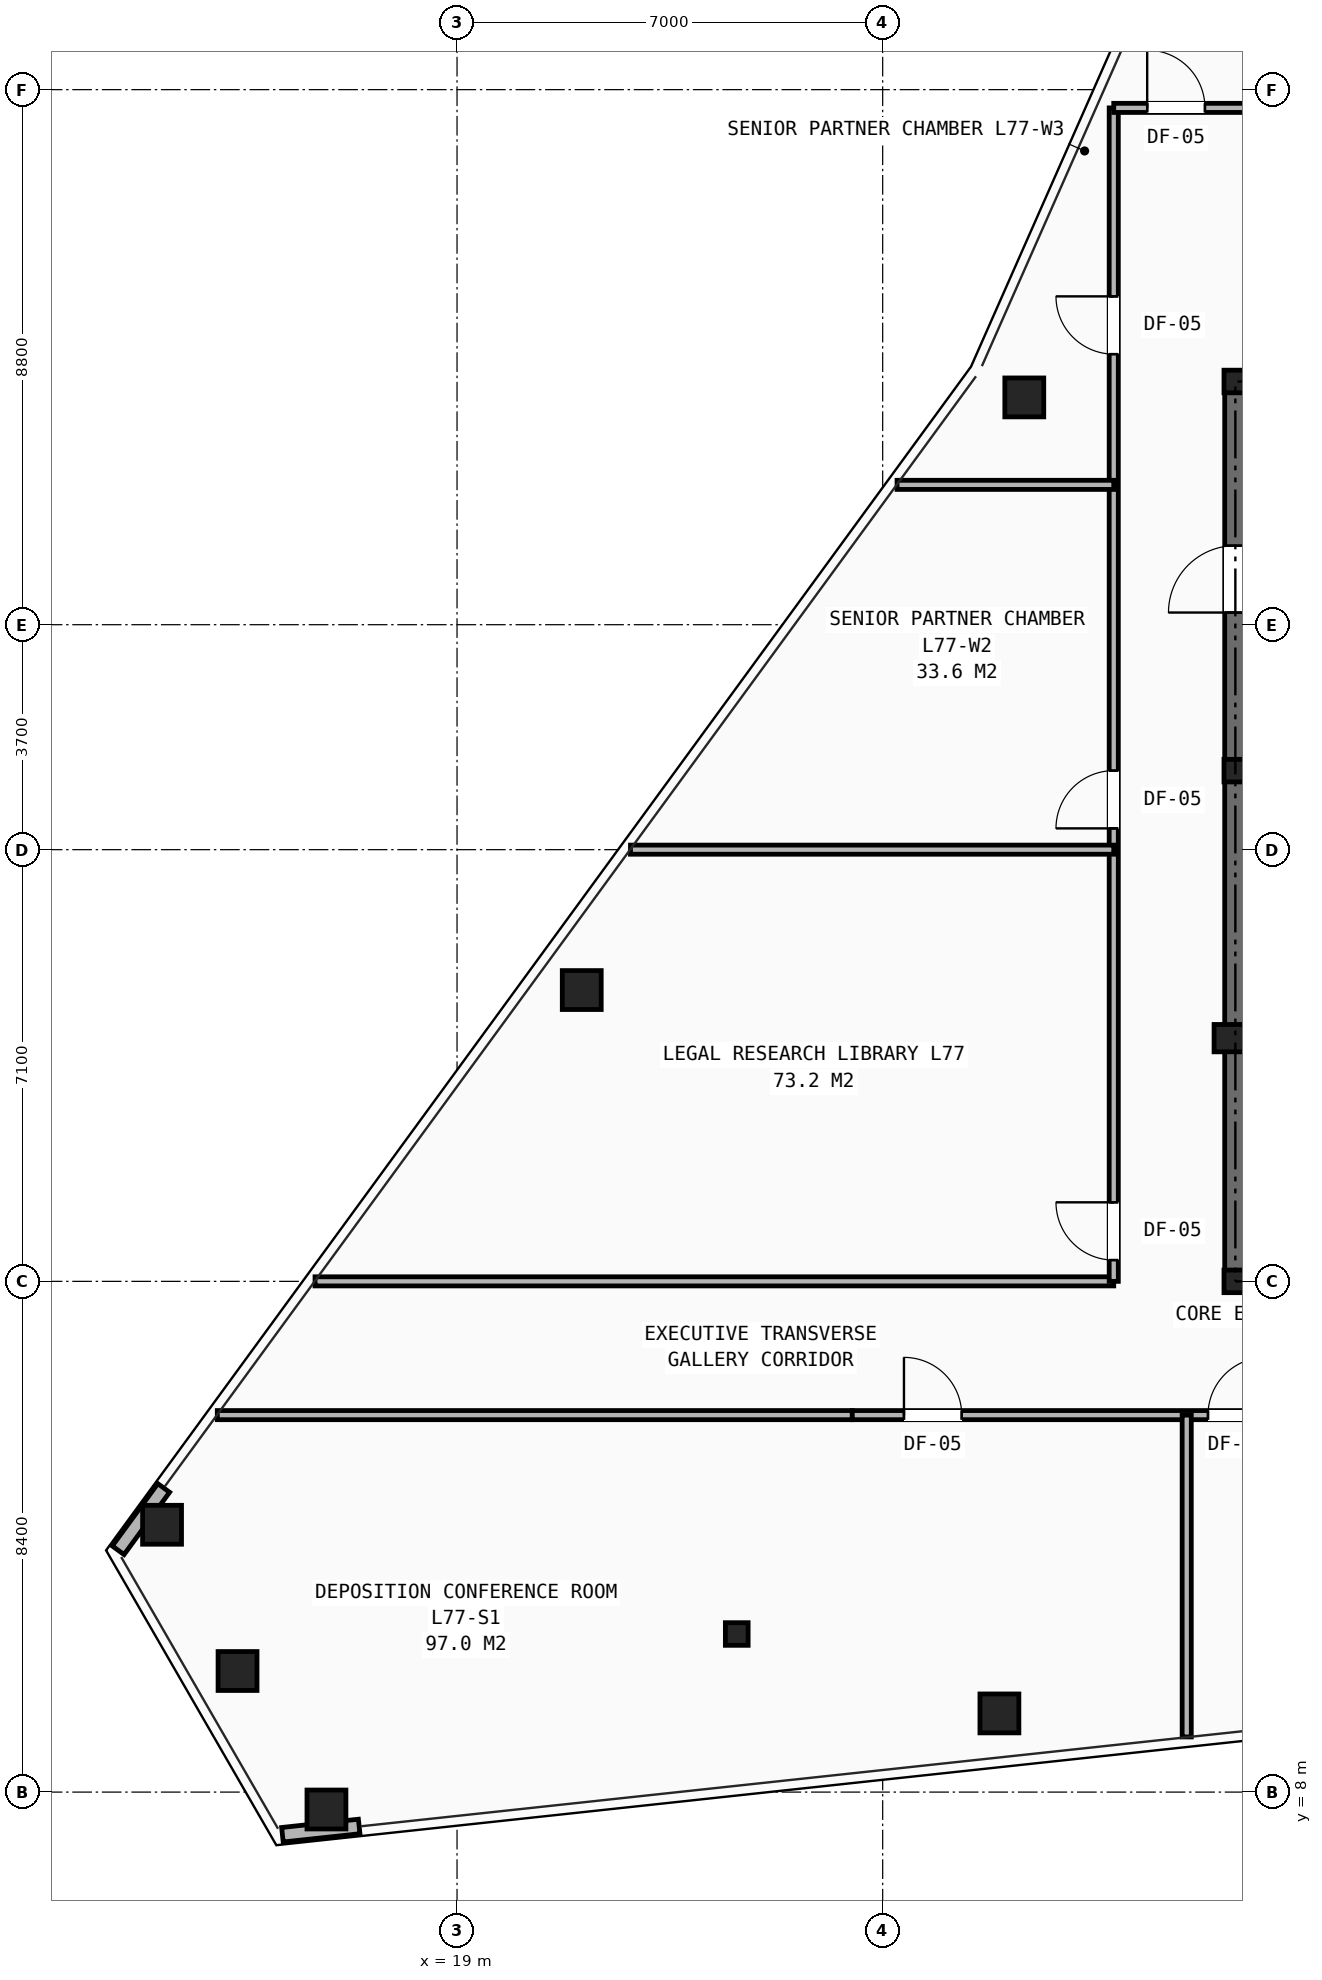
"""IFC4 building model, lengths in metres.
Left out: names, types, materials, properties, quantities, classifications, styles, units other than length and angle.
Written with IfcOpenShell. Run it as: python <this file> out.ifc"""

import sys

from ifc_helpers import new_model, si_unit, direction, frame, frame_2d, origin, origin_2d, place, context, subcontext, project, spatial, rectangle, hollow_rectangle, i_section, extrude, element, fill, save


model = new_model("IFC4")
c1 = context("Model", 3, precision=1e-05, world=origin(), true_north=direction((0.0, 1.0)))
c2 = subcontext(c1, "Body", "Model", "MODEL_VIEW")
j1 = project(units=[si_unit("LENGTHUNIT", "METRE"), si_unit("PLANEANGLEUNIT", "RADIAN")], contexts=[c1])
p1 = place(None, origin())
s1 = spatial("IfcSite", under=j1, at=p1, CompositionType="ELEMENT")
p2 = place(p1, origin())
s2 = spatial("IfcBuilding", under=s1, at=p2, CompositionType="ELEMENT")
p3 = place(p2, frame((0.0, 0.0, 272.5)))
s3 = spatial("IfcBuildingStorey", under=s2, at=p3, CompositionType="ELEMENT", Elevation=272.5)
for number, where, z_axis, x_axis in (
    (1, (31.8, 16.4, 0.0), (0.0, 0.0, 1.0), (1.0, 0.0, 0.0)),
    (2, (31.8, 24.8, 0.0), (0.0, 0.0, 1.0), (1.0, 0.0, 0.0)),
    (3, (31.8, 31.2, 0.0), (0.0, 0.0, 1.0), (1.0, 0.0, 0.0)),
    (4, (23.6, 10.6, 0.0), (0.0, 0.0, 1.0), (1.0, 0.0, 0.0)),
):
    element("IfcColumn", number, at=place(p3, frame(where, z_axis=z_axis, x_axis=x_axis)), inside=s3, PredefinedType="COLUMN", context=c2, shape_type="SweptSolid", body=[
        extrude(i_section(OverallWidth=0.374, OverallDepth=0.372, WebThickness=0.016, FlangeThickness=0.026, at=origin_2d()), origin(), (0.0, 0.0, 1.0), 3.5),
    ])
p4 = place(p3, frame((31.8, 20.4, 0.0), z_axis=(0.0, 0.0, 1.0), x_axis=(1.0, 0.0, 0.0)))
e5 = element("IfcColumn", 5, at=p4, inside=s3, PredefinedType="PILASTER", context=c2, shape_type="SweptSolid", body=[
    extrude(rectangle(XDim=0.7, YDim=0.45, at=origin_2d()), origin(), (0.0, 0.0, 1.0), 3.5),
])
for number, where, z_axis, x_axis in (
    (6, (28.329, 30.938, 0.0), (0.0, 0.0, 1.0), (1.0, 0.0, 0.0)),
    (7, (21.051, 21.191, 0.0), (0.0, 0.0, 1.0), (1.0, 0.0, 0.0)),
    (8, (14.149, 12.397, 0.0), (0.0, 0.0, 1.0), (1.0, 0.0, 0.0)),
    (9, (15.39, 9.991, 0.0), (0.0, 0.0, 1.0), (1.0, 0.0, 0.0)),
    (10, (16.852, 7.714, 0.0), (0.0, 0.0, 1.0), (1.0, 0.0, 0.0)),
    (11, (27.92, 9.294, 0.0), (0.0, 0.0, 1.0), (1.0, 0.0, 0.0)),
):
    element("IfcColumn", number, at=place(p3, frame(where, z_axis=z_axis, x_axis=x_axis)), inside=s3, PredefinedType="COLUMN", context=c2, shape_type="SweptSolid", body=[
        extrude(hollow_rectangle(XDim=0.64, YDim=0.64, WallThickness=0.045, at=origin_2d()), origin(), (0.0, 0.0, 1.0), 3.5),
    ])
for number, where, z_axis, x_axis in (
    (12, (14.176, 13.002, 0.0), (0.0, 0.0, 1.0), (-0.59, -0.807, 0.0)),
    (13, (16.128, 7.298, 0.0), (0.0, 0.0, 1.0), (0.994, 0.107, 0.0)),
):
    element("IfcWall", number, at=place(p3, frame(where, z_axis=z_axis, x_axis=x_axis)), inside=s3, PredefinedType="SHEAR", context=c2, shape_type="SweptSolid", body=[
        extrude(rectangle(XDim=1.269, YDim=0.24, at=frame_2d((0.635, 0.0))), origin(), (0.0, 0.0, 1.0), 2.623),
    ])
p5 = place(p3, frame((31.8, 16.4, 0.0), z_axis=(0.0, 0.0, 1.0), x_axis=(1.0, 0.0, 0.0)))
e14 = element("IfcWall", 14, at=p5, inside=s3, PredefinedType="SHEAR", context=c2, shape_type="SweptSolid", body=[
    extrude(rectangle(XDim=16.4, YDim=0.35, at=frame_2d((8.2, 0.0))), origin(), (0.0, 0.0, 1.0), 3.25),
])
p6 = place(p5, frame((4.2, 0.0, 0.0)))
e15 = element("IfcOpeningElement", 15, at=p6, cuts=e14, PredefinedType="OPENING", context=c2, shape_type="SweptSolid", body=[
    extrude(rectangle(XDim=0.95, YDim=2.1, at=frame_2d((0.475, 1.05))), frame((0.0, 0.185, 0.0), z_axis=(0.0, -1.0, 0.0), x_axis=(1.0, 0.0, 0.0)), (0.0, 0.0, 1.0), 0.37),
])
p7 = place(p5, frame((10.6, 0.0, 0.0)))
e16 = element("IfcOpeningElement", 16, at=p7, cuts=e14, PredefinedType="OPENING", context=c2, shape_type="SweptSolid", body=[
    extrude(rectangle(XDim=0.95, YDim=2.1, at=frame_2d((0.475, 1.05))), frame((0.0, 0.185, 0.0), z_axis=(0.0, -1.0, 0.0), x_axis=(1.0, 0.0, 0.0)), (0.0, 0.0, 1.0), 0.37),
])
p8 = place(p3, frame((31.8, 31.2, 0.0), z_axis=(0.0, 0.0, 1.0), x_axis=(1.0, 0.0, 0.0)))
e17 = element("IfcWall", 17, at=p8, inside=s3, PredefinedType="SHEAR", context=c2, shape_type="SweptSolid", body=[
    extrude(rectangle(XDim=16.4, YDim=0.35, at=frame_2d((8.2, 0.0))), origin(), (0.0, 0.0, 1.0), 3.25),
])
p9 = place(p3, frame((31.8, 16.4, 0.0), z_axis=(0.0, 0.0, 1.0), x_axis=(0.0, 1.0, 0.0)))
e18 = element("IfcWall", 18, at=p9, inside=s3, PredefinedType="SHEAR", context=c2, shape_type="SweptSolid", body=[
    extrude(rectangle(XDim=14.8, YDim=0.35, at=frame_2d((7.4, 0.0))), origin(), (0.0, 0.0, 1.0), 3.25),
])
p10 = place(p9, frame((11.0, 0.0, 0.0)))
e19 = element("IfcOpeningElement", 19, at=p10, cuts=e18, PredefinedType="OPENING", context=c2, shape_type="SweptSolid", body=[
    extrude(rectangle(XDim=1.1, YDim=2.15, at=frame_2d((0.55, 1.075))), frame((0.0, 0.185, 0.0), z_axis=(0.0, -1.0, 0.0), x_axis=(1.0, 0.0, 0.0)), (0.0, 0.0, 1.0), 0.37),
])
p11 = place(p3, frame((31.8, 24.755, 0.0), z_axis=(0.0, 0.0, 1.0), x_axis=(1.0, 0.0, 0.0)))
e20 = element("IfcWall", 20, at=p11, inside=s3, PredefinedType="SHEAR", context=c2, shape_type="SweptSolid", body=[
    extrude(rectangle(XDim=3.245, YDim=0.25, at=frame_2d((1.623, 0.0))), origin(), (0.0, 0.0, 1.0), 3.25),
])
p12 = place(p3, frame((15.057, 14.2, 0.0), z_axis=(0.0, 0.0, 1.0), x_axis=(1.0, 0.0, 0.0)))
e21 = element("IfcWall", 21, at=p12, inside=s3, PredefinedType="PARTITIONING", context=c2, shape_type="SweptSolid", body=[
    extrude(rectangle(XDim=10.443, YDim=0.15, at=frame_2d((5.221, 0.0))), origin(), (0.0, 0.0, 1.0), 2.265),
])
p13 = place(p3, frame((16.665, 16.4, 0.0), z_axis=(0.0, 0.0, 1.0), x_axis=(1.0, 0.0, 0.0)))
e22 = element("IfcWall", 22, at=p13, inside=s3, PredefinedType="PARTITIONING", context=c2, shape_type="SweptSolid", body=[
    extrude(rectangle(XDim=13.135, YDim=0.15, at=frame_2d((6.568, 0.0))), origin(), (0.0, 0.0, 1.0), 2.265),
])
p14 = place(p3, frame((29.8, 16.4, 0.0), z_axis=(0.0, 0.0, 1.0), x_axis=(0.0, 1.0, 0.0)))
e23 = element("IfcWall", 23, at=p14, inside=s3, PredefinedType="PARTITIONING", context=c2, shape_type="SweptSolid", body=[
    extrude(rectangle(XDim=19.3, YDim=0.15, at=frame_2d((9.65, 0.0))), origin(), (0.0, 0.0, 1.0), 2.265),
])
p15 = place(p14, frame((0.35, 0.0, 0.0)))
e24 = element("IfcOpeningElement", 24, at=p15, cuts=e23, PredefinedType="OPENING", context=c2, shape_type="SweptSolid", body=[
    extrude(rectangle(XDim=0.95, YDim=2.1, at=frame_2d((0.475, 1.05))), frame((0.0, 0.085, 0.0), z_axis=(0.0, -1.0, 0.0), x_axis=(1.0, 0.0, 0.0)), (0.0, 0.0, 1.0), 0.17),
])
p16 = place(p14, frame((7.45, 0.0, 0.0)))
e25 = element("IfcOpeningElement", 25, at=p16, cuts=e23, PredefinedType="OPENING", context=c2, shape_type="SweptSolid", body=[
    extrude(rectangle(XDim=0.95, YDim=2.1, at=frame_2d((0.475, 1.05))), frame((0.0, 0.085, 0.0), z_axis=(0.0, -1.0, 0.0), x_axis=(1.0, 0.0, 0.0)), (0.0, 0.0, 1.0), 0.17),
])
p17 = place(p14, frame((15.25, 0.0, 0.0)))
e26 = element("IfcOpeningElement", 26, at=p17, cuts=e23, PredefinedType="OPENING", context=c2, shape_type="SweptSolid", body=[
    extrude(rectangle(XDim=0.95, YDim=2.1, at=frame_2d((0.475, 1.05))), frame((0.0, 0.085, 0.0), z_axis=(0.0, -1.0, 0.0), x_axis=(1.0, 0.0, 0.0)), (0.0, 0.0, 1.0), 0.17),
])
p18 = place(p3, frame((29.8, 35.7, 0.0), z_axis=(0.0, 0.0, 1.0), x_axis=(1.0, 0.0, 0.0)))
e27 = element("IfcWall", 27, at=p18, inside=s3, PredefinedType="PARTITIONING", context=c2, shape_type="SweptSolid", body=[
    extrude(rectangle(XDim=9.45, YDim=0.15, at=frame_2d((4.725, 0.0))), origin(), (0.0, 0.0, 1.0), 2.628),
])
p19 = place(p18, frame((0.55, 0.0, 0.0)))
e28 = element("IfcOpeningElement", 28, at=p19, cuts=e27, PredefinedType="OPENING", context=c2, shape_type="SweptSolid", body=[
    extrude(rectangle(XDim=0.95, YDim=2.1, at=frame_2d((0.475, 1.05))), frame((0.0, 0.085, 0.0), z_axis=(0.0, -1.0, 0.0), x_axis=(1.0, 0.0, 0.0)), (0.0, 0.0, 1.0), 0.17),
])
p20 = place(p18, frame((5.35, 0.0, 0.0)))
e29 = element("IfcOpeningElement", 29, at=p20, cuts=e27, PredefinedType="OPENING", context=c2, shape_type="SweptSolid", body=[
    extrude(rectangle(XDim=0.95, YDim=2.1, at=frame_2d((0.475, 1.05))), frame((0.0, 0.085, 0.0), z_axis=(0.0, -1.0, 0.0), x_axis=(1.0, 0.0, 0.0)), (0.0, 0.0, 1.0), 0.17),
])
p21 = place(p3, frame((25.5, 14.2, 0.0), z_axis=(0.0, 0.0, 1.0), x_axis=(1.0, 0.0, 0.0)))
e30 = element("IfcWall", 30, at=p21, inside=s3, PredefinedType="PARTITIONING", context=c2, shape_type="SweptSolid", body=[
    extrude(rectangle(XDim=29.0, YDim=0.15, at=frame_2d((14.5, 0.0))), origin(), (0.0, 0.0, 1.0), 2.265),
])
p22 = place(p21, frame((0.85, 0.0, 0.0)))
e31 = element("IfcOpeningElement", 31, at=p22, cuts=e30, PredefinedType="OPENING", context=c2, shape_type="SweptSolid", body=[
    extrude(rectangle(XDim=0.95, YDim=2.1, at=frame_2d((0.475, 1.05))), frame((0.0, 0.085, 0.0), z_axis=(0.0, -1.0, 0.0), x_axis=(1.0, 0.0, 0.0)), (0.0, 0.0, 1.0), 0.17),
])
p23 = place(p21, frame((5.85, 0.0, 0.0)))
e32 = element("IfcOpeningElement", 32, at=p23, cuts=e30, PredefinedType="OPENING", context=c2, shape_type="SweptSolid", body=[
    extrude(rectangle(XDim=0.95, YDim=2.1, at=frame_2d((0.475, 1.05))), frame((0.0, 0.085, 0.0), z_axis=(0.0, -1.0, 0.0), x_axis=(1.0, 0.0, 0.0)), (0.0, 0.0, 1.0), 0.17),
])
p24 = place(p21, frame((23.85, 0.0, 0.0)))
e33 = element("IfcOpeningElement", 33, at=p24, cuts=e30, PredefinedType="OPENING", context=c2, shape_type="SweptSolid", body=[
    extrude(rectangle(XDim=0.95, YDim=2.1, at=frame_2d((0.475, 1.05))), frame((0.0, 0.085, 0.0), z_axis=(0.0, -1.0, 0.0), x_axis=(1.0, 0.0, 0.0)), (0.0, 0.0, 1.0), 0.17),
])
p25 = place(p3, frame((31.0, 8.907, 0.0), z_axis=(0.0, 0.0, 1.0), x_axis=(0.0, 1.0, 0.0)))
e34 = element("IfcWall", 34, at=p25, inside=s3, PredefinedType="PARTITIONING", context=c2, shape_type="SweptSolid", body=[
    extrude(rectangle(XDim=5.293, YDim=0.15, at=frame_2d((2.646, 0.0))), origin(), (0.0, 0.0, 1.0), 2.628),
])
p26 = place(p3, frame((21.852, 23.5, 0.0), z_axis=(0.0, 0.0, 1.0), x_axis=(1.0, 0.0, 0.0)))
e35 = element("IfcWall", 35, at=p26, inside=s3, PredefinedType="PARTITIONING", context=c2, shape_type="SweptSolid", body=[
    extrude(rectangle(XDim=7.948, YDim=0.15, at=frame_2d((3.974, 0.0))), origin(), (0.0, 0.0, 1.0), 2.628),
])
p27 = place(p3, frame((26.236, 29.5, 0.0), z_axis=(0.0, 0.0, 1.0), x_axis=(1.0, 0.0, 0.0)))
e36 = element("IfcWall", 36, at=p27, inside=s3, PredefinedType="PARTITIONING", context=c2, shape_type="SweptSolid", body=[
    extrude(rectangle(XDim=3.564, YDim=0.15, at=frame_2d((1.782, 0.0))), origin(), (0.0, 0.0, 1.0), 2.628),
])
p28 = place(p10, origin())
e37 = element("IfcDoor", 37, at=p28, inside=s3, OperationType="SINGLE_SWING_LEFT", PredefinedType="DOOR", context=c2, shape_type="SweptSolid", body=[
    extrude(rectangle(XDim=1.1, YDim=2.15, at=frame_2d((0.55, 1.075))), frame((0.0, 0.025, 0.0), z_axis=(0.0, -1.0, 0.0), x_axis=(1.0, 0.0, 0.0)), (0.0, 0.0, 1.0), 0.05),
])
fill(e19, e37)
p29 = place(p22, origin())
e38 = element("IfcDoor", 38, at=p29, inside=s3, OperationType="SINGLE_SWING_LEFT", PredefinedType="DOOR", context=c2, shape_type="SweptSolid", body=[
    extrude(rectangle(XDim=0.95, YDim=2.1, at=frame_2d((0.475, 1.05))), frame((0.0, 0.025, 0.0), z_axis=(0.0, -1.0, 0.0), x_axis=(1.0, 0.0, 0.0)), (0.0, 0.0, 1.0), 0.05),
])
fill(e31, e38)
p30 = place(p23, origin())
e39 = element("IfcDoor", 39, at=p30, inside=s3, OperationType="SINGLE_SWING_RIGHT", PredefinedType="DOOR", context=c2, shape_type="SweptSolid", body=[
    extrude(rectangle(XDim=0.95, YDim=2.1, at=frame_2d((0.475, 1.05))), frame((0.0, 0.025, 0.0), z_axis=(0.0, -1.0, 0.0), x_axis=(1.0, 0.0, 0.0)), (0.0, 0.0, 1.0), 0.05),
])
fill(e32, e39)
p31 = place(p15, origin())
e40 = element("IfcDoor", 40, at=p31, inside=s3, OperationType="SINGLE_SWING_RIGHT", PredefinedType="DOOR", context=c2, shape_type="SweptSolid", body=[
    extrude(rectangle(XDim=0.95, YDim=2.1, at=frame_2d((0.475, 1.05))), frame((0.0, 0.025, 0.0), z_axis=(0.0, -1.0, 0.0), x_axis=(1.0, 0.0, 0.0)), (0.0, 0.0, 1.0), 0.05),
])
fill(e24, e40)
p32 = place(p16, origin())
e41 = element("IfcDoor", 41, at=p32, inside=s3, OperationType="SINGLE_SWING_LEFT", PredefinedType="DOOR", context=c2, shape_type="SweptSolid", body=[
    extrude(rectangle(XDim=0.95, YDim=2.1, at=frame_2d((0.475, 1.05))), frame((0.0, 0.025, 0.0), z_axis=(0.0, -1.0, 0.0), x_axis=(1.0, 0.0, 0.0)), (0.0, 0.0, 1.0), 0.05),
])
fill(e25, e41)
p33 = place(p17, origin())
e42 = element("IfcDoor", 42, at=p33, inside=s3, OperationType="SINGLE_SWING_RIGHT", PredefinedType="DOOR", context=c2, shape_type="SweptSolid", body=[
    extrude(rectangle(XDim=0.95, YDim=2.1, at=frame_2d((0.475, 1.05))), frame((0.0, 0.025, 0.0), z_axis=(0.0, -1.0, 0.0), x_axis=(1.0, 0.0, 0.0)), (0.0, 0.0, 1.0), 0.05),
])
fill(e26, e42)
p34 = place(p19, origin())
e43 = element("IfcDoor", 43, at=p34, inside=s3, OperationType="SINGLE_SWING_LEFT", PredefinedType="DOOR", context=c2, shape_type="SweptSolid", body=[
    extrude(rectangle(XDim=0.95, YDim=2.1, at=frame_2d((0.475, 1.05))), frame((0.0, 0.025, 0.0), z_axis=(0.0, -1.0, 0.0), x_axis=(1.0, 0.0, 0.0)), (0.0, 0.0, 1.0), 0.05),
])
fill(e28, e43)
save(model, sys.argv[1])
